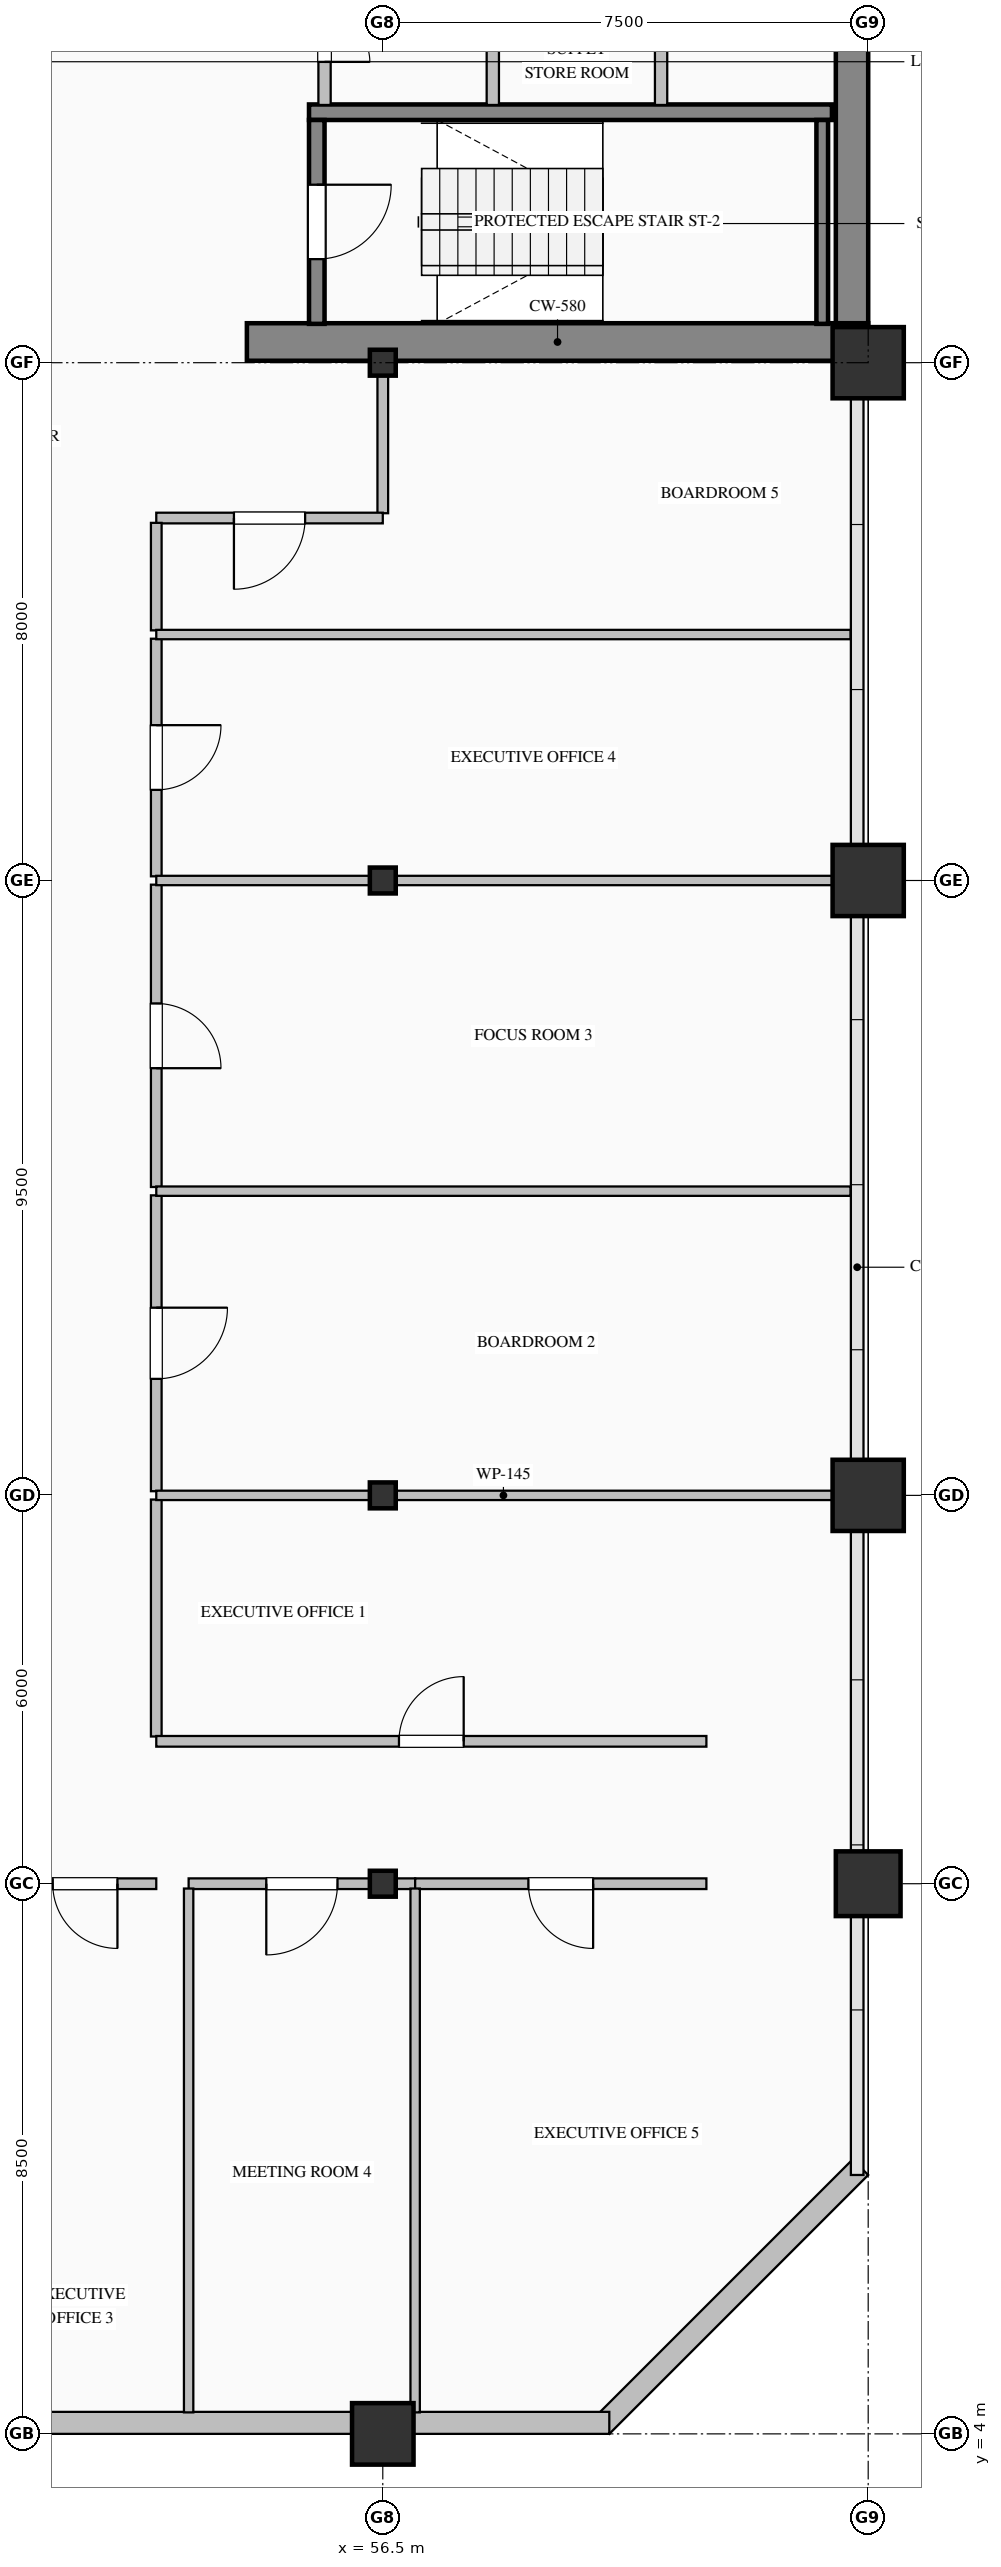
"""IFC4 building model, lengths in metres.
Left out: names, types, materials, properties, quantities, classifications, styles, units other than length and angle.
Written with IfcOpenShell. Run it as: python <this file> out.ifc"""

import sys

from ifc_helpers import new_model, si_unit, direction, frame, frame_2d, origin, origin_2d, place, context, subcontext, project, spatial, rectangle, hollow_rectangle, hollow_circle, i_section, extrude, element, fill, save


model = new_model("IFC4")
c1 = context("Model", 3, precision=1e-05, world=origin(), true_north=direction((0.0, 1.0)))
c2 = subcontext(c1, "Body", "Model", "MODEL_VIEW")
j1 = project(units=[si_unit("LENGTHUNIT", "METRE"), si_unit("PLANEANGLEUNIT", "RADIAN")], contexts=[c1])
p1 = place(None, origin())
s1 = spatial("IfcSite", under=j1, at=p1, CompositionType="ELEMENT")
p2 = place(p1, origin())
s2 = spatial("IfcBuilding", under=s1, at=p2, CompositionType="ELEMENT")
p3 = place(p2, frame((0.0, 0.0, 127.0)))
s3 = spatial("IfcBuildingStorey", under=s2, at=p3, CompositionType="ELEMENT", Elevation=127.0)
p4 = place(p3, frame((63.75, 36.32, 0.0), z_axis=(0.0, 0.0, 1.0), x_axis=(0.0, 1.0, 0.0)))
e1 = element("IfcWall", 1, at=p4, inside=s3, PredefinedType="SHEAR", context=c2, shape_type="SweptSolid", body=[
    extrude(rectangle(XDim=15.18, YDim=0.5, at=frame_2d((7.59, 0.0))), origin(), (0.0, 0.0, 1.0), 3.765),
])
p5 = place(p3, frame((54.4, 36.32, 0.0), z_axis=(0.0, 0.0, 1.0), x_axis=(1.0, 0.0, 0.0)))
e2 = element("IfcWall", 2, at=p5, inside=s3, PredefinedType="SHEAR", context=c2, shape_type="SweptSolid", body=[
    extrude(rectangle(XDim=9.6, YDim=0.58, at=frame_2d((4.8, 0.0))), origin(), (0.0, 0.0, 1.0), 4.0),
])
p6 = place(p3, frame((56.5, 4.0, 0.0), z_axis=(0.0, 0.0, 1.0), x_axis=(1.0, 0.0, 0.0)))
e3 = element("IfcColumn", 3, at=p6, inside=s3, PredefinedType="COLUMN", context=c2, shape_type="SweptSolid", body=[
    extrude(hollow_rectangle(XDim=0.95, YDim=0.95, WallThickness=0.036, at=origin_2d()), origin(), (0.0, 0.0, 1.0), 4.0),
])
for number, where, z_axis, x_axis in (
    (4, (56.5, 12.5, 0.0), (0.0, 0.0, 1.0), (1.0, 0.0, 0.0)),
    (5, (56.5, 18.5, 0.0), (0.0, 0.0, 1.0), (1.0, 0.0, 0.0)),
    (6, (56.5, 28.0, 0.0), (0.0, 0.0, 1.0), (1.0, 0.0, 0.0)),
    (7, (56.5, 36.0, 0.0), (0.0, 0.0, 1.0), (1.0, 0.0, 0.0)),
):
    element("IfcColumn", number, at=place(p3, frame(where, z_axis=z_axis, x_axis=x_axis)), inside=s3, PredefinedType="COLUMN", context=c2, shape_type="SweptSolid", body=[
        extrude(i_section(OverallWidth=0.4, OverallDepth=0.4, WebThickness=0.013, FlangeThickness=0.021, FilletRadius=0.022, at=origin_2d()), origin(), (0.0, 0.0, 1.0), 4.0),
    ])
p7 = place(p3, frame((64.0, 12.5, 0.0), z_axis=(0.0, 0.0, 1.0), x_axis=(1.0, 0.0, 0.0)))
e8 = element("IfcColumn", 8, at=p7, inside=s3, PredefinedType="COLUMN", context=c2, shape_type="SweptSolid", body=[
    extrude(hollow_circle(Radius=0.5, WallThickness=0.036, at=origin_2d()), origin(), (0.0, 0.0, 1.0), 4.0),
])
for number, where, z_axis, x_axis in (
    (9, (64.0, 18.5, 0.0), (0.0, 0.0, 1.0), (1.0, 0.0, 0.0)),
    (10, (64.0, 28.0, 0.0), (0.0, 0.0, 1.0), (1.0, 0.0, 0.0)),
    (11, (64.0, 36.0, 0.0), (0.0, 0.0, 1.0), (1.0, 0.0, 0.0)),
):
    element("IfcColumn", number, at=place(p3, frame(where, z_axis=z_axis, x_axis=x_axis)), inside=s3, PredefinedType="COLUMN", context=c2, shape_type="SweptSolid", body=[
        extrude(hollow_rectangle(XDim=1.1, YDim=1.1, WallThickness=0.04, at=origin_2d()), origin(), (0.0, 0.0, 1.0), 4.0),
    ])
p8 = place(p3, frame((63.88, 8.12, 0.0), z_axis=(0.0, 0.0, 1.0), x_axis=(-0.707106781187, -0.707106781187, 0.0)))
e12 = element("IfcWall", 12, at=p8, inside=s3, PredefinedType="SOLIDWALL", context=c2, shape_type="SweptSolid", body=[
    extrude(rectangle(XDim=5.657, YDim=0.34, at=frame_2d((2.828, 0.0))), origin(), (0.0, 0.0, 1.0), 3.765),
])
p9 = place(p3, frame((60.0, 4.17, 0.0), z_axis=(0.0, 0.0, 1.0), x_axis=(-1.0, 0.0, 0.0)))
e13 = element("IfcWall", 13, at=p9, inside=s3, PredefinedType="SOLIDWALL", context=c2, shape_type="SweptSolid", body=[
    extrude(rectangle(XDim=15.5, YDim=0.34, at=frame_2d((7.75, 0.0))), origin(), (0.0, 0.0, 1.0), 3.265),
])
p10 = place(p3, frame((55.36, 39.87, 0.0), z_axis=(0.0, 0.0, 1.0), x_axis=(1.0, 0.0, 0.0)))
e14 = element("IfcWall", 14, at=p10, inside=s3, PredefinedType="SOLIDWALL", context=c2, shape_type="SweptSolid", body=[
    extrude(rectangle(XDim=8.08, YDim=0.24, at=frame_2d((4.04, 0.0))), origin(), (0.0, 0.0, 1.0), 4.0),
])
p11 = place(p3, frame((55.48, 39.75, 0.0), z_axis=(0.0, 0.0, 1.0), x_axis=(0.0, -1.0, 0.0)))
e15 = element("IfcWall", 15, at=p11, inside=s3, PredefinedType="SOLIDWALL", context=c2, shape_type="SweptSolid", body=[
    extrude(rectangle(XDim=3.15, YDim=0.24, at=frame_2d((1.575, 0.0))), origin(), (0.0, 0.0, 1.0), 4.0),
])
p12 = place(p11, frame((1.0, 0.0, 0.0)))
e16 = element("IfcOpeningElement", 16, at=p12, cuts=e15, PredefinedType="OPENING", context=c2, shape_type="SweptSolid", body=[
    extrude(rectangle(XDim=1.15, YDim=2.2, at=frame_2d((0.575, 1.1))), frame((0.0, 0.13, 0.0), z_axis=(0.0, -1.0, 0.0), x_axis=(1.0, 0.0, 0.0)), (0.0, 0.0, 1.0), 0.26),
])
p13 = place(p3, frame((63.29, 36.6, 0.0), z_axis=(0.0, 0.0, 1.0), x_axis=(0.0, 1.0, 0.0)))
e17 = element("IfcWall", 17, at=p13, inside=s3, PredefinedType="SOLIDWALL", context=c2, shape_type="SweptSolid", body=[
    extrude(rectangle(XDim=3.15, YDim=0.18, at=frame_2d((1.575, 0.0))), origin(), (0.0, 0.0, 1.0), 4.0),
])
p14 = place(p3, frame((55.6, 42.713, 0.0), z_axis=(0.0, 0.0, 1.0), x_axis=(0.0, -1.0, 0.0)))
e18 = element("IfcWall", 18, at=p14, inside=s3, PredefinedType="PARTITIONING", context=c2, shape_type="SweptSolid", body=[
    extrude(rectangle(XDim=2.731, YDim=0.19, at=frame_2d((1.365, 0.0))), origin(), (0.0, 0.0, 1.0), 3.765),
])
p15 = place(p14, frame((0.666, 0.0, 0.0)))
e19 = element("IfcOpeningElement", 19, at=p15, cuts=e18, PredefinedType="OPENING", context=c2, shape_type="SweptSolid", body=[
    extrude(rectangle(XDim=1.4, YDim=2.25, at=frame_2d((0.7, 1.125))), frame((0.0, 0.105, 0.0), z_axis=(0.0, -1.0, 0.0), x_axis=(1.0, 0.0, 0.0)), (0.0, 0.0, 1.0), 0.21),
])
for number, where, z_axis, x_axis in (
    (20, (58.2, 42.713, 0.0), (0.0, 0.0, 1.0), (0.0, -1.0, 0.0)),
    (21, (60.8, 42.713, 0.0), (0.0, 0.0, 1.0), (0.0, -1.0, 0.0)),
):
    element("IfcWall", number, at=place(p3, frame(where, z_axis=z_axis, x_axis=x_axis)), inside=s3, PredefinedType="PARTITIONING", context=c2, shape_type="SweptSolid", body=[
        extrude(rectangle(XDim=2.731, YDim=0.19, at=frame_2d((1.365, 0.0))), origin(), (0.0, 0.0, 1.0), 3.765),
    ])
p16 = place(p3, frame((56.5, 36.0, 0.0), z_axis=(0.0, 0.0, 1.0), x_axis=(0.0, -1.0, 0.0)))
e22 = element("IfcWall", 22, at=p16, inside=s3, PredefinedType="PARTITIONING", context=c2, shape_type="SweptSolid", body=[
    extrude(rectangle(XDim=2.325, YDim=0.165, at=frame_2d((1.163, 0.0))), origin(), (0.0, 0.0, 1.0), 3.157),
])
p17 = place(p3, frame((56.5, 33.6, 0.0), z_axis=(0.0, 0.0, 1.0), x_axis=(-1.0, 0.0, 0.0)))
e23 = element("IfcWall", 23, at=p17, inside=s3, PredefinedType="PARTITIONING", context=c2, shape_type="SweptSolid", body=[
    extrude(rectangle(XDim=3.5, YDim=0.165, at=frame_2d((1.75, 0.0))), origin(), (0.0, 0.0, 1.0), 3.765),
])
p18 = place(p17, frame((1.2, 0.0, 0.0)))
e24 = element("IfcOpeningElement", 24, at=p18, cuts=e23, PredefinedType="OPENING", context=c2, shape_type="SweptSolid", body=[
    extrude(rectangle(XDim=1.1, YDim=2.2, at=frame_2d((0.55, 1.1))), frame((0.0, 0.093, 0.0), z_axis=(0.0, -1.0, 0.0), x_axis=(1.0, 0.0, 0.0)), (0.0, 0.0, 1.0), 0.185),
])
p19 = place(p3, frame((53.0, 18.436, 0.0), z_axis=(0.0, 0.0, 1.0), x_axis=(0.0, -1.0, 0.0)))
e25 = element("IfcWall", 25, at=p19, inside=s3, PredefinedType="PARTITIONING", context=c2, shape_type="SweptSolid", body=[
    extrude(rectangle(XDim=3.661, YDim=0.165, at=frame_2d((1.831, 0.0))), origin(), (0.0, 0.0, 1.0), 3.765),
])
p20 = place(p3, frame((53.0, 23.135, 0.0), z_axis=(0.0, 0.0, 1.0), x_axis=(0.0, -1.0, 0.0)))
e26 = element("IfcWall", 26, at=p20, inside=s3, PredefinedType="PARTITIONING", context=c2, shape_type="SweptSolid", body=[
    extrude(rectangle(XDim=4.571, YDim=0.165, at=frame_2d((2.286, 0.0))), origin(), (0.0, 0.0, 1.0), 3.765),
])
p21 = place(p20, frame((1.736, 0.0, 0.0)))
e27 = element("IfcOpeningElement", 27, at=p21, cuts=e26, PredefinedType="OPENING", context=c2, shape_type="SweptSolid", body=[
    extrude(rectangle(XDim=1.1, YDim=2.2, at=frame_2d((0.55, 1.1))), frame((0.0, 0.093, 0.0), z_axis=(0.0, -1.0, 0.0), x_axis=(1.0, 0.0, 0.0)), (0.0, 0.0, 1.0), 0.185),
])
p22 = place(p3, frame((53.0, 27.936, 0.0), z_axis=(0.0, 0.0, 1.0), x_axis=(0.0, -1.0, 0.0)))
e28 = element("IfcWall", 28, at=p22, inside=s3, PredefinedType="PARTITIONING", context=c2, shape_type="SweptSolid", body=[
    extrude(rectangle(XDim=4.671, YDim=0.165, at=frame_2d((2.335, 0.0))), origin(), (0.0, 0.0, 1.0), 3.765),
])
p23 = place(p22, frame((1.835, 0.0, 0.0)))
e29 = element("IfcOpeningElement", 29, at=p23, cuts=e28, PredefinedType="OPENING", context=c2, shape_type="SweptSolid", body=[
    extrude(rectangle(XDim=1.0, YDim=2.15, at=frame_2d((0.5, 1.075))), frame((0.0, 0.093, 0.0), z_axis=(0.0, -1.0, 0.0), x_axis=(1.0, 0.0, 0.0)), (0.0, 0.0, 1.0), 0.185),
])
p24 = place(p3, frame((53.0, 31.736, 0.0), z_axis=(0.0, 0.0, 1.0), x_axis=(0.0, -1.0, 0.0)))
e30 = element("IfcWall", 30, at=p24, inside=s3, PredefinedType="PARTITIONING", context=c2, shape_type="SweptSolid", body=[
    extrude(rectangle(XDim=3.671, YDim=0.165, at=frame_2d((1.835, 0.0))), origin(), (0.0, 0.0, 1.0), 3.765),
])
p25 = place(p24, frame((1.335, 0.0, 0.0)))
e31 = element("IfcOpeningElement", 31, at=p25, cuts=e30, PredefinedType="OPENING", context=c2, shape_type="SweptSolid", body=[
    extrude(rectangle(XDim=1.0, YDim=2.15, at=frame_2d((0.5, 1.075))), frame((0.0, 0.093, 0.0), z_axis=(0.0, -1.0, 0.0), x_axis=(1.0, 0.0, 0.0)), (0.0, 0.0, 1.0), 0.185),
])
p26 = place(p3, frame((53.0, 33.525, 0.0), z_axis=(0.0, 0.0, 1.0), x_axis=(0.0, -1.0, 0.0)))
e32 = element("IfcWall", 32, at=p26, inside=s3, PredefinedType="PARTITIONING", context=c2, shape_type="SweptSolid", body=[
    extrude(rectangle(XDim=1.661, YDim=0.165, at=frame_2d((0.831, 0.0))), origin(), (0.0, 0.0, 1.0), 3.765),
])
p27 = place(p3, frame((53.0, 12.5, 0.0), z_axis=(0.0, 0.0, 1.0), x_axis=(-1.0, 0.0, 0.0)))
e33 = element("IfcWall", 33, at=p27, inside=s3, PredefinedType="PARTITIONING", context=c2, shape_type="SweptSolid", body=[
    extrude(rectangle(XDim=2.2, YDim=0.165, at=frame_2d((1.1, 0.0))), origin(), (0.0, 0.0, 1.0), 3.157),
])
p28 = place(p27, frame((0.6, 0.0, 0.0)))
e34 = element("IfcOpeningElement", 34, at=p28, cuts=e33, PredefinedType="OPENING", context=c2, shape_type="SweptSolid", body=[
    extrude(rectangle(XDim=1.0, YDim=2.15, at=frame_2d((0.5, 1.075))), frame((0.0, 0.093, 0.0), z_axis=(0.0, -1.0, 0.0), x_axis=(1.0, 0.0, 0.0)), (0.0, 0.0, 1.0), 0.185),
])
p29 = place(p3, frame((53.0, 14.7, 0.0), z_axis=(0.0, 0.0, 1.0), x_axis=(1.0, 0.0, 0.0)))
e35 = element("IfcWall", 35, at=p29, inside=s3, PredefinedType="PARTITIONING", context=c2, shape_type="SweptSolid", body=[
    extrude(rectangle(XDim=8.5, YDim=0.165, at=frame_2d((4.25, 0.0))), origin(), (0.0, 0.0, 1.0), 3.765),
])
p30 = place(p29, frame((3.75, 0.0, 0.0)))
e36 = element("IfcOpeningElement", 36, at=p30, cuts=e35, PredefinedType="OPENING", context=c2, shape_type="SweptSolid", body=[
    extrude(rectangle(XDim=1.0, YDim=2.15, at=frame_2d((0.5, 1.075))), frame((0.0, 0.093, 0.0), z_axis=(0.0, -1.0, 0.0), x_axis=(1.0, 0.0, 0.0)), (0.0, 0.0, 1.0), 0.185),
])
p31 = place(p3, frame((57.0, 12.5, 0.0), z_axis=(0.0, 0.0, 1.0), x_axis=(-1.0, 0.0, 0.0)))
e37 = element("IfcWall", 37, at=p31, inside=s3, PredefinedType="PARTITIONING", context=c2, shape_type="SweptSolid", body=[
    extrude(rectangle(XDim=3.5, YDim=0.165, at=frame_2d((1.75, 0.0))), origin(), (0.0, 0.0, 1.0), 3.157),
])
p32 = place(p31, frame((1.2, 0.0, 0.0)))
e38 = element("IfcOpeningElement", 38, at=p32, cuts=e37, PredefinedType="OPENING", context=c2, shape_type="SweptSolid", body=[
    extrude(rectangle(XDim=1.1, YDim=2.2, at=frame_2d((0.55, 1.1))), frame((0.0, 0.093, 0.0), z_axis=(0.0, -1.0, 0.0), x_axis=(1.0, 0.0, 0.0)), (0.0, 0.0, 1.0), 0.185),
])
p33 = place(p3, frame((61.5, 12.5, 0.0), z_axis=(0.0, 0.0, 1.0), x_axis=(-1.0, 0.0, 0.0)))
e39 = element("IfcWall", 39, at=p33, inside=s3, PredefinedType="PARTITIONING", context=c2, shape_type="SweptSolid", body=[
    extrude(rectangle(XDim=4.5, YDim=0.165, at=frame_2d((2.25, 0.0))), origin(), (0.0, 0.0, 1.0), 3.157),
])
p34 = place(p33, frame((1.75, 0.0, 0.0)))
e40 = element("IfcOpeningElement", 40, at=p34, cuts=e39, PredefinedType="OPENING", context=c2, shape_type="SweptSolid", body=[
    extrude(rectangle(XDim=1.0, YDim=2.15, at=frame_2d((0.5, 1.075))), frame((0.0, 0.093, 0.0), z_axis=(0.0, -1.0, 0.0), x_axis=(1.0, 0.0, 0.0)), (0.0, 0.0, 1.0), 0.185),
])
p35 = place(p3, frame((53.0, 18.5, 0.0), z_axis=(0.0, 0.0, 1.0), x_axis=(1.0, 0.0, 0.0)))
e41 = element("IfcWall", 41, at=p35, inside=s3, PredefinedType="PARTITIONING", context=c2, shape_type="SweptSolid", body=[
    extrude(rectangle(XDim=10.728, YDim=0.145, at=frame_2d((5.364, 0.0))), origin(), (0.0, 0.0, 1.0), 3.157),
])
p36 = place(p3, frame((53.0, 23.2, 0.0), z_axis=(0.0, 0.0, 1.0), x_axis=(1.0, 0.0, 0.0)))
e42 = element("IfcWall", 42, at=p36, inside=s3, PredefinedType="PARTITIONING", context=c2, shape_type="SweptSolid", body=[
    extrude(rectangle(XDim=10.728, YDim=0.145, at=frame_2d((5.364, 0.0))), origin(), (0.0, 0.0, 1.0), 3.407),
])
p37 = place(p3, frame((53.0, 28.0, 0.0), z_axis=(0.0, 0.0, 1.0), x_axis=(1.0, 0.0, 0.0)))
e43 = element("IfcWall", 43, at=p37, inside=s3, PredefinedType="PARTITIONING", context=c2, shape_type="SweptSolid", body=[
    extrude(rectangle(XDim=10.728, YDim=0.145, at=frame_2d((5.364, 0.0))), origin(), (0.0, 0.0, 1.0), 3.157),
])
p38 = place(p3, frame((53.0, 31.8, 0.0), z_axis=(0.0, 0.0, 1.0), x_axis=(1.0, 0.0, 0.0)))
e44 = element("IfcWall", 44, at=p38, inside=s3, PredefinedType="PARTITIONING", context=c2, shape_type="SweptSolid", body=[
    extrude(rectangle(XDim=10.728, YDim=0.145, at=frame_2d((5.364, 0.0))), origin(), (0.0, 0.0, 1.0), 3.765),
])
for number, where, z_axis, x_axis in (
    (45, (53.5, 12.426, 0.0), (0.0, 0.0, 1.0), (0.0, -1.0, 0.0)),
    (46, (57.0, 12.426, 0.0), (0.0, 0.0, 1.0), (0.0, -1.0, 0.0)),
):
    element("IfcWall", number, at=place(p3, frame(where, z_axis=z_axis, x_axis=x_axis)), inside=s3, PredefinedType="PARTITIONING", context=c2, shape_type="SweptSolid", body=[
        extrude(rectangle(XDim=8.094, YDim=0.145, at=frame_2d((4.047, 0.0))), origin(), (0.0, 0.0, 1.0), 3.765),
    ])
p39 = place(p12, origin())
e47 = element("IfcDoor", 47, at=p39, inside=s3, OperationType="SINGLE_SWING_LEFT", PredefinedType="DOOR", context=c2, shape_type="SweptSolid", body=[
    extrude(rectangle(XDim=1.15, YDim=2.2, at=frame_2d((0.575, 1.1))), frame((0.0, 0.025, 0.0), z_axis=(0.0, -1.0, 0.0), x_axis=(1.0, 0.0, 0.0)), (0.0, 0.0, 1.0), 0.05),
])
fill(e16, e47)
p40 = place(p15, origin())
e48 = element("IfcDoor", 48, at=p40, inside=s3, OperationType="DOUBLE_DOOR_SINGLE_SWING", PredefinedType="DOOR", context=c2, shape_type="SweptSolid", body=[
    extrude(rectangle(XDim=1.4, YDim=2.25, at=frame_2d((0.7, 1.125))), frame((0.0, 0.025, 0.0), z_axis=(0.0, -1.0, 0.0), x_axis=(1.0, 0.0, 0.0)), (0.0, 0.0, 1.0), 0.05),
])
fill(e19, e48)
p41 = place(p30, origin())
e49 = element("IfcDoor", 49, at=p41, inside=s3, OperationType="SINGLE_SWING_RIGHT", PredefinedType="DOOR", context=c2, shape_type="SweptSolid", body=[
    extrude(rectangle(XDim=1.0, YDim=2.15, at=frame_2d((0.5, 1.075))), frame((0.0, 0.025, 0.0), z_axis=(0.0, -1.0, 0.0), x_axis=(1.0, 0.0, 0.0)), (0.0, 0.0, 1.0), 0.05),
])
fill(e36, e49)
p42 = place(p21, origin())
e50 = element("IfcDoor", 50, at=p42, inside=s3, OperationType="SINGLE_SWING_LEFT", PredefinedType="DOOR", context=c2, shape_type="SweptSolid", body=[
    extrude(rectangle(XDim=1.1, YDim=2.2, at=frame_2d((0.55, 1.1))), frame((0.0, 0.025, 0.0), z_axis=(0.0, -1.0, 0.0), x_axis=(1.0, 0.0, 0.0)), (0.0, 0.0, 1.0), 0.05),
])
fill(e27, e50)
p43 = place(p23, origin())
e51 = element("IfcDoor", 51, at=p43, inside=s3, OperationType="SINGLE_SWING_RIGHT", PredefinedType="DOOR", context=c2, shape_type="SweptSolid", body=[
    extrude(rectangle(XDim=1.0, YDim=2.15, at=frame_2d((0.5, 1.075))), frame((0.0, 0.025, 0.0), z_axis=(0.0, -1.0, 0.0), x_axis=(1.0, 0.0, 0.0)), (0.0, 0.0, 1.0), 0.05),
])
fill(e29, e51)
p44 = place(p25, origin())
e52 = element("IfcDoor", 52, at=p44, inside=s3, OperationType="SINGLE_SWING_LEFT", PredefinedType="DOOR", context=c2, shape_type="SweptSolid", body=[
    extrude(rectangle(XDim=1.0, YDim=2.15, at=frame_2d((0.5, 1.075))), frame((0.0, 0.025, 0.0), z_axis=(0.0, -1.0, 0.0), x_axis=(1.0, 0.0, 0.0)), (0.0, 0.0, 1.0), 0.05),
])
fill(e31, e52)
p45 = place(p18, origin())
e53 = element("IfcDoor", 53, at=p45, inside=s3, OperationType="SINGLE_SWING_RIGHT", PredefinedType="DOOR", context=c2, shape_type="SweptSolid", body=[
    extrude(rectangle(XDim=1.1, YDim=2.2, at=frame_2d((0.55, 1.1))), frame((0.0, 0.025, 0.0), z_axis=(0.0, -1.0, 0.0), x_axis=(1.0, 0.0, 0.0)), (0.0, 0.0, 1.0), 0.05),
])
fill(e24, e53)
p46 = place(p28, origin())
e54 = element("IfcDoor", 54, at=p46, inside=s3, OperationType="SINGLE_SWING_LEFT", PredefinedType="DOOR", context=c2, shape_type="SweptSolid", body=[
    extrude(rectangle(XDim=1.0, YDim=2.15, at=frame_2d((0.5, 1.075))), frame((0.0, 0.025, 0.0), z_axis=(0.0, -1.0, 0.0), x_axis=(1.0, 0.0, 0.0)), (0.0, 0.0, 1.0), 0.05),
])
fill(e34, e54)
p47 = place(p32, origin())
e55 = element("IfcDoor", 55, at=p47, inside=s3, OperationType="SINGLE_SWING_RIGHT", PredefinedType="DOOR", context=c2, shape_type="SweptSolid", body=[
    extrude(rectangle(XDim=1.1, YDim=2.2, at=frame_2d((0.55, 1.1))), frame((0.0, 0.025, 0.0), z_axis=(0.0, -1.0, 0.0), x_axis=(1.0, 0.0, 0.0)), (0.0, 0.0, 1.0), 0.05),
])
fill(e38, e55)
p48 = place(p34, origin())
e56 = element("IfcDoor", 56, at=p48, inside=s3, OperationType="SINGLE_SWING_LEFT", PredefinedType="DOOR", context=c2, shape_type="SweptSolid", body=[
    extrude(rectangle(XDim=1.0, YDim=2.15, at=frame_2d((0.5, 1.075))), frame((0.0, 0.025, 0.0), z_axis=(0.0, -1.0, 0.0), x_axis=(1.0, 0.0, 0.0)), (0.0, 0.0, 1.0), 0.05),
])
fill(e40, e56)
save(model, sys.argv[1])
